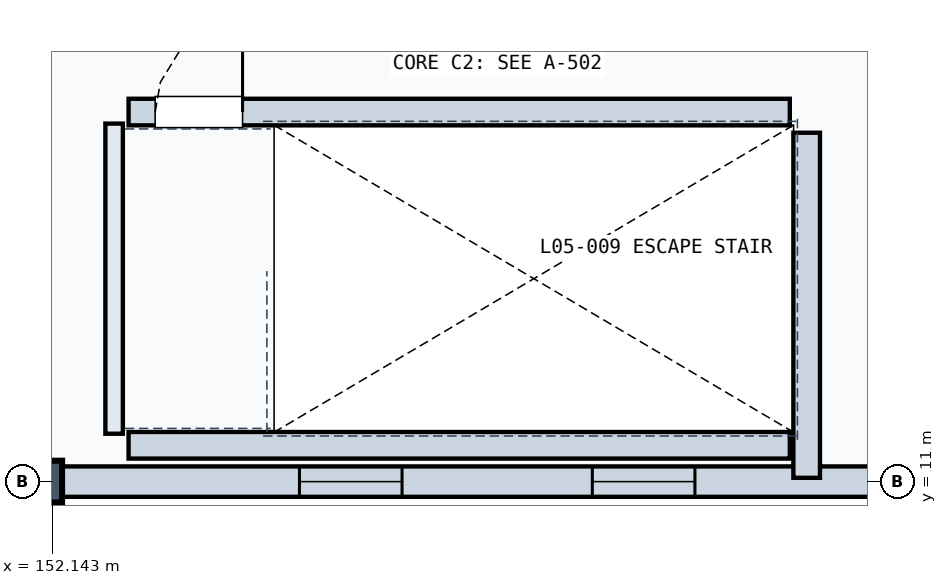
"""IFC4 building model, lengths in metres.
Left out: names, types, materials, properties, quantities, classifications, styles, units other than length and angle.
Written with IfcOpenShell. Run it as: python <this file> out.ifc"""

import sys

from ifc_helpers import new_model, si_unit, direction, frame, frame_2d, origin, origin_2d, place, context, subcontext, project, spatial, rectangle, extrude, element, fill, save


model = new_model("IFC4")
c1 = context("Model", 3, precision=1e-05, world=origin(), true_north=direction((0.0, 1.0)))
c2 = subcontext(c1, "Body", "Model", "MODEL_VIEW")
j1 = project(units=[si_unit("LENGTHUNIT", "METRE"), si_unit("PLANEANGLEUNIT", "RADIAN")], contexts=[c1])
p1 = place(None, origin())
s1 = spatial("IfcSite", under=j1, at=p1, CompositionType="ELEMENT")
p2 = place(p1, origin())
s2 = spatial("IfcBuilding", under=s1, at=p2, CompositionType="ELEMENT")
p3 = place(p2, frame((0.0, 0.0, 24.3)))
s3 = spatial("IfcBuildingStorey", under=s2, at=p3, CompositionType="ELEMENT", Elevation=24.3)
p4 = place(p3, frame((152.0, 11.0, 0.0), z_axis=(0.0, 0.0, 1.0), x_axis=(1.0, 0.0, 0.0)))
e1 = element("IfcColumn", 1, at=p4, inside=s3, PredefinedType="COLUMN", context=c2, shape_type="SweptSolid", body=[
    extrude(rectangle(XDim=0.55, YDim=0.55, at=origin_2d()), origin(), (0.0, 0.0, 1.0), 5.4),
])
p5 = place(p3, frame((152.22, 11.0, 0.0), z_axis=(0.0, 0.0, 1.0), x_axis=(1.0, 0.0, 0.0)))
e2 = element("IfcWall", 2, at=p5, inside=s3, PredefinedType="SOLIDWALL", context=c2, shape_type="SweptSolid", body=[
    extrude(rectangle(XDim=11.56, YDim=0.4, at=frame_2d((5.78, 0.0))), origin(), (0.0, 0.0, 1.0), 5.185),
])
p6 = place(p5, frame((3.178, 0.0, 0.8)))
e3 = element("IfcOpeningElement", 3, at=p6, cuts=e2, PredefinedType="OPENING", context=c2, shape_type="SweptSolid", body=[
    extrude(rectangle(XDim=1.35, YDim=2.1, at=frame_2d((0.675, 1.05))), frame((0.0, 0.21, 0.0), z_axis=(0.0, -1.0, 0.0), x_axis=(1.0, 0.0, 0.0)), (0.0, 0.0, 1.0), 0.42),
])
p7 = place(p5, frame((7.032, 0.0, 0.8)))
e4 = element("IfcOpeningElement", 4, at=p7, cuts=e2, PredefinedType="OPENING", context=c2, shape_type="SweptSolid", body=[
    extrude(rectangle(XDim=1.35, YDim=2.1, at=frame_2d((0.675, 1.05))), frame((0.0, 0.21, 0.0), z_axis=(0.0, -1.0, 0.0), x_axis=(1.0, 0.0, 0.0)), (0.0, 0.0, 1.0), 0.42),
])
p8 = place(p3, frame((152.96, 11.63, 0.0), z_axis=(0.0, 0.0, 1.0), x_axis=(0.0, 1.0, 0.0)))
e5 = element("IfcWall", 5, at=p8, inside=s3, PredefinedType="SOLIDWALL", context=c2, shape_type="SweptSolid", body=[
    extrude(rectangle(XDim=4.08, YDim=0.23, at=frame_2d((2.04, 0.0))), origin(), (0.0, 0.0, 1.0), 5.18),
])
p9 = place(p3, frame((162.072, 11.05, 0.0), z_axis=(0.0, 0.0, 1.0), x_axis=(0.0, 1.0, 0.0)))
e6 = element("IfcWall", 6, at=p9, inside=s3, PredefinedType="SOLIDWALL", context=c2, shape_type="SweptSolid", body=[
    extrude(rectangle(XDim=4.54, YDim=0.35, at=frame_2d((2.27, 0.0))), origin(), (0.0, 0.0, 1.0), 5.18),
])
p10 = place(p3, frame((153.15, 11.478, 0.0), z_axis=(0.0, 0.0, 1.0), x_axis=(1.0, 0.0, 0.0)))
e7 = element("IfcWall", 7, at=p10, inside=s3, PredefinedType="SOLIDWALL", context=c2, shape_type="SweptSolid", body=[
    extrude(rectangle(XDim=8.7, YDim=0.35, at=frame_2d((4.35, 0.0))), origin(), (0.0, 0.0, 1.0), 5.18),
])
p11 = place(p3, frame((153.15, 15.862, 0.0), z_axis=(0.0, 0.0, 1.0), x_axis=(1.0, 0.0, 0.0)))
e8 = element("IfcWall", 8, at=p11, inside=s3, PredefinedType="SOLIDWALL", context=c2, shape_type="SweptSolid", body=[
    extrude(rectangle(XDim=8.7, YDim=0.35, at=frame_2d((4.35, 0.0))), origin(), (0.0, 0.0, 1.0), 5.18),
])
p12 = place(p11, frame((0.35, 0.0, 0.0)))
e9 = element("IfcOpeningElement", 9, at=p12, cuts=e8, PredefinedType="OPENING", context=c2, shape_type="SweptSolid", body=[
    extrude(rectangle(XDim=1.15, YDim=2.2, at=frame_2d((0.575, 1.1))), frame((0.0, 0.185, 0.0), z_axis=(0.0, -1.0, 0.0), x_axis=(1.0, 0.0, 0.0)), (0.0, 0.0, 1.0), 0.37),
])
p13 = place(p6, origin())
e10 = element("IfcWindow", 10, at=p13, inside=s3, PartitioningType="SINGLE_PANEL", PredefinedType="WINDOW", context=c2, shape_type="SweptSolid", body=[
    extrude(rectangle(XDim=1.35, YDim=2.1, at=frame_2d((0.675, 1.05))), frame((0.0, 0.03, 0.0), z_axis=(0.0, -1.0, 0.0), x_axis=(1.0, 0.0, 0.0)), (0.0, 0.0, 1.0), 0.06),
])
fill(e3, e10)
p14 = place(p7, origin())
e11 = element("IfcWindow", 11, at=p14, inside=s3, PartitioningType="SINGLE_PANEL", PredefinedType="WINDOW", context=c2, shape_type="SweptSolid", body=[
    extrude(rectangle(XDim=1.35, YDim=2.1, at=frame_2d((0.675, 1.05))), frame((0.0, 0.03, 0.0), z_axis=(0.0, -1.0, 0.0), x_axis=(1.0, 0.0, 0.0)), (0.0, 0.0, 1.0), 0.06),
])
fill(e4, e11)
p15 = place(p12, origin())
e12 = element("IfcDoor", 12, at=p15, inside=s3, OperationType="SINGLE_SWING_RIGHT", PredefinedType="DOOR", context=c2, shape_type="SweptSolid", body=[
    extrude(rectangle(XDim=1.15, YDim=2.2, at=frame_2d((0.575, 1.1))), frame((0.0, 0.025, 0.0), z_axis=(0.0, -1.0, 0.0), x_axis=(1.0, 0.0, 0.0)), (0.0, 0.0, 1.0), 0.05),
])
fill(e9, e12)
save(model, sys.argv[1])
